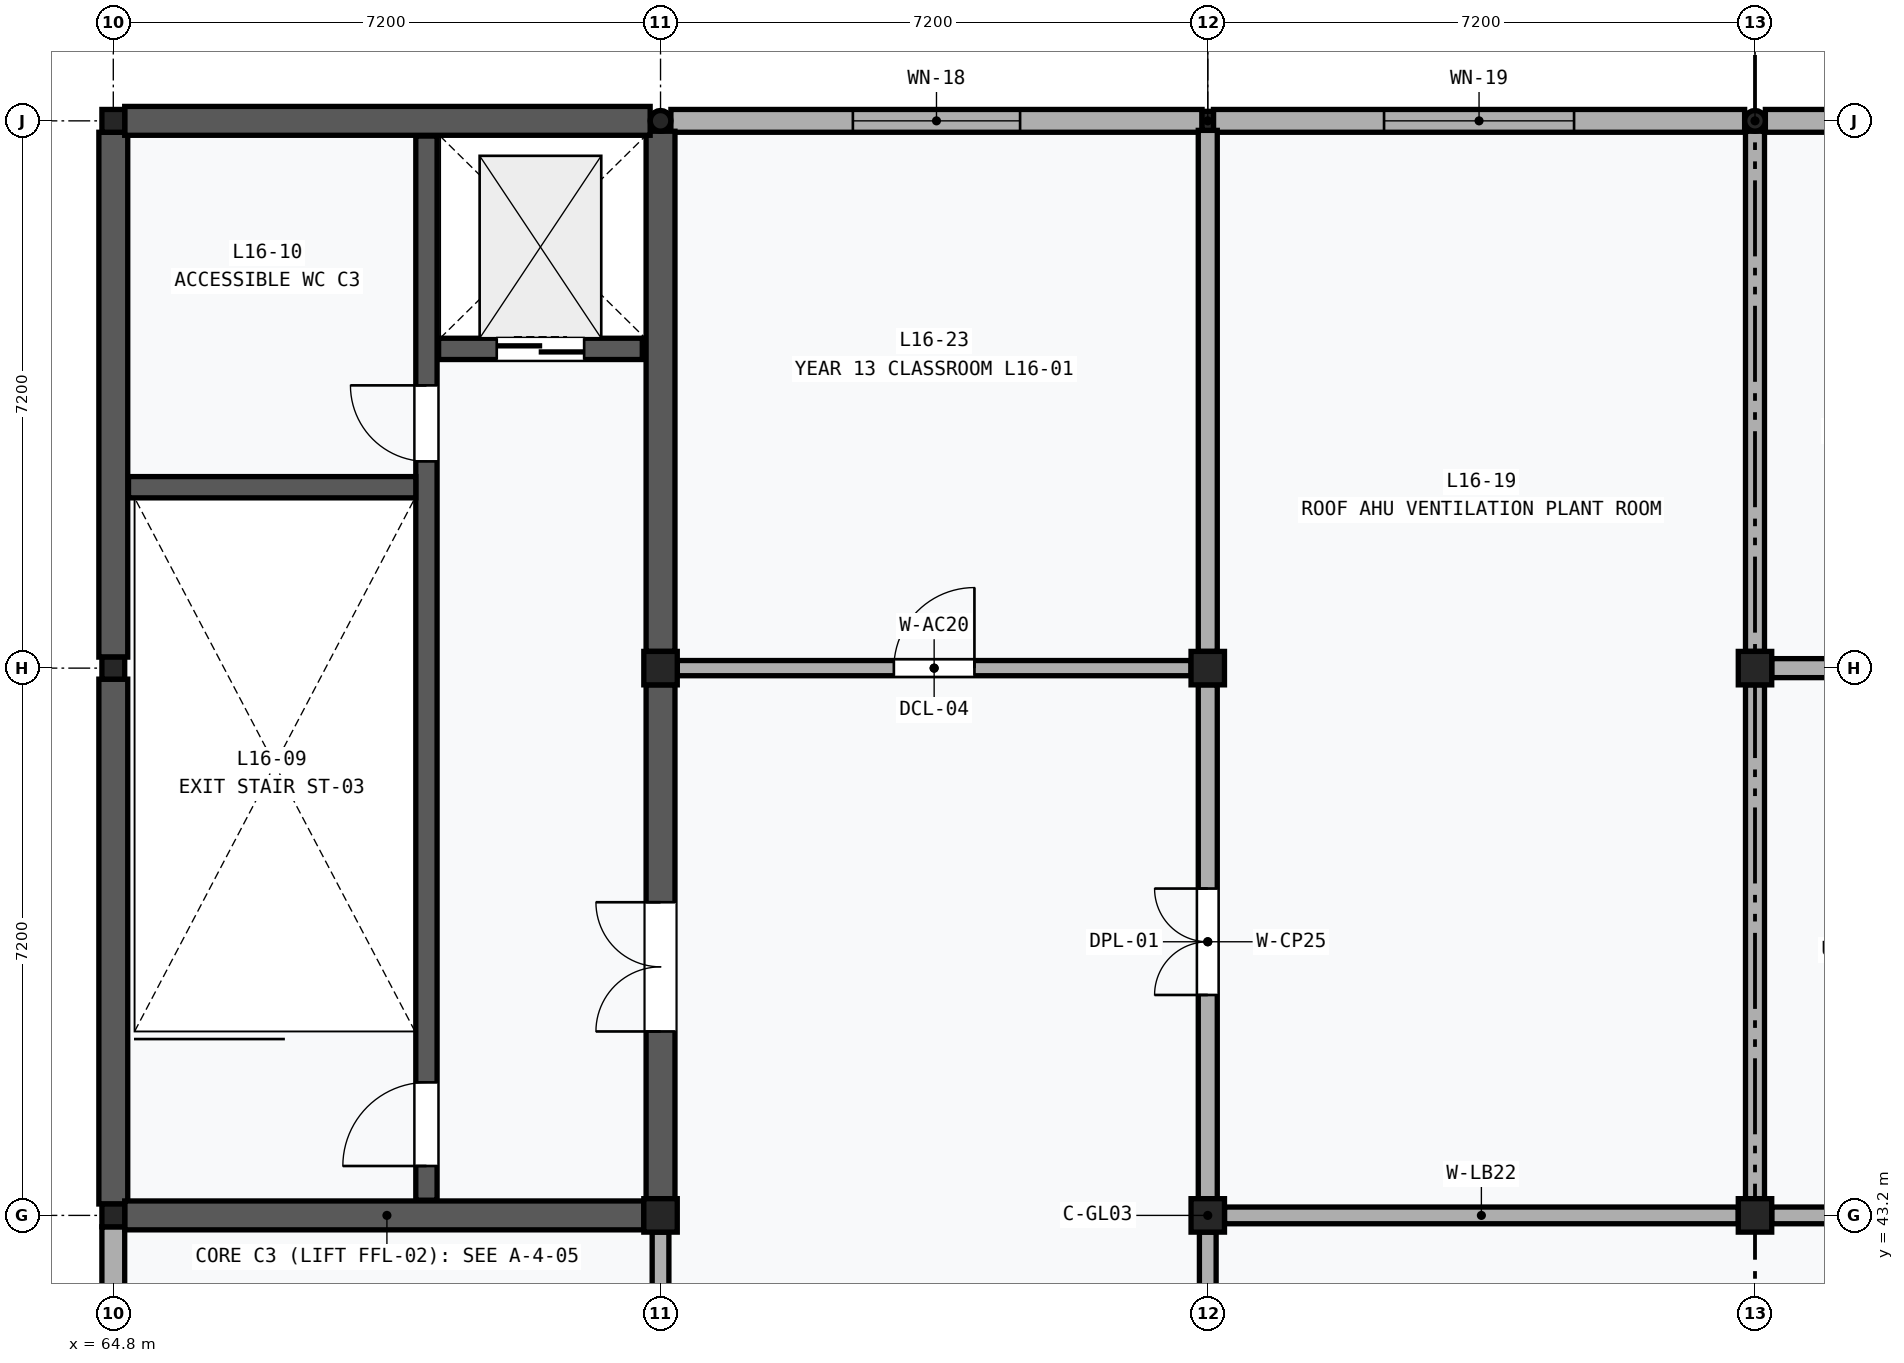
"""IFC4 building model, lengths in metres.
Left out: names, types, materials, properties, quantities, classifications, styles, units other than length and angle.
Written with IfcOpenShell. Run it as: python <this file> out.ifc"""

import sys

from ifc_helpers import new_model, si_unit, direction, frame, frame_2d, origin, origin_2d, place, context, subcontext, project, spatial, rectangle, hollow_rectangle, hollow_circle, i_section, extrude, element, fill, save


model = new_model("IFC4")
c1 = context("Model", 3, precision=1e-05, world=origin(), true_north=direction((0.0, 1.0)))
c2 = subcontext(c1, "Body", "Model", "MODEL_VIEW")
j1 = project(units=[si_unit("LENGTHUNIT", "METRE"), si_unit("PLANEANGLEUNIT", "RADIAN")], contexts=[c1])
p1 = place(None, origin())
s1 = spatial("IfcSite", under=j1, at=p1, CompositionType="ELEMENT")
p2 = place(p1, origin())
s2 = spatial("IfcBuilding", under=s1, at=p2, CompositionType="ELEMENT")
p3 = place(p2, frame((0.0, 0.0, 67.2)))
s3 = spatial("IfcBuildingStorey", under=s2, at=p3, CompositionType="ELEMENT", Elevation=67.2)
p4 = place(p3, frame((64.8, 43.2, 0.0), z_axis=(0.0, 0.0, 1.0), x_axis=(1.0, 0.0, 0.0)))
e1 = element("IfcColumn", 1, at=p4, inside=s3, PredefinedType="COLUMN", context=c2, shape_type="SweptSolid", body=[
    extrude(i_section(OverallWidth=0.3, OverallDepth=0.3, WebThickness=0.011, FlangeThickness=0.019, FilletRadius=0.027, at=origin_2d()), origin(), (0.0, 0.0, 1.0), 4.8),
])
p5 = place(p3, frame((64.8, 50.4, 0.0), z_axis=(0.0, 0.0, 1.0), x_axis=(1.0, 0.0, 0.0)))
e2 = element("IfcColumn", 2, at=p5, inside=s3, PredefinedType="COLUMN", context=c2, shape_type="SweptSolid", body=[
    extrude(i_section(OverallWidth=0.3, OverallDepth=0.29, WebThickness=0.009, FlangeThickness=0.014, FilletRadius=0.027, at=origin_2d()), origin(), (0.0, 0.0, 1.0), 4.8),
])
p6 = place(p3, frame((64.8, 57.6, 0.0), z_axis=(0.0, 0.0, 1.0), x_axis=(1.0, 0.0, 0.0)))
e3 = element("IfcColumn", 3, at=p6, inside=s3, PredefinedType="COLUMN", context=c2, shape_type="SweptSolid", body=[
    extrude(i_section(OverallWidth=0.3, OverallDepth=0.3, WebThickness=0.011, FlangeThickness=0.019, FilletRadius=0.027, at=origin_2d()), origin(), (0.0, 0.0, 1.0), 4.8),
])
for number, where, z_axis, x_axis in (
    (4, (72.0, 43.2, 0.0), (0.0, 0.0, 1.0), (1.0, 0.0, 0.0)),
    (5, (72.0, 50.4, 0.0), (0.0, 0.0, 1.0), (1.0, 0.0, 0.0)),
):
    element("IfcColumn", number, at=place(p3, frame(where, z_axis=z_axis, x_axis=x_axis)), inside=s3, PredefinedType="COLUMN", context=c2, shape_type="SweptSolid", body=[
        extrude(rectangle(XDim=0.44, YDim=0.44, at=origin_2d()), origin(), (0.0, 0.0, 1.0), 4.8),
    ])
p7 = place(p3, frame((72.0, 57.6, 0.0), z_axis=(0.0, 0.0, 1.0), x_axis=(1.0, 0.0, 0.0)))
e6 = element("IfcColumn", 6, at=p7, inside=s3, PredefinedType="COLUMN", context=c2, shape_type="SweptSolid", body=[
    extrude(hollow_circle(Radius=0.136, WallThickness=0.012, at=origin_2d()), origin(), (0.0, 0.0, 1.0), 4.8),
])
for number, where, z_axis, x_axis in (
    (7, (79.2, 43.2, 0.0), (0.0, 0.0, 1.0), (1.0, 0.0, 0.0)),
    (8, (79.2, 50.4, 0.0), (0.0, 0.0, 1.0), (1.0, 0.0, 0.0)),
):
    element("IfcColumn", number, at=place(p3, frame(where, z_axis=z_axis, x_axis=x_axis)), inside=s3, PredefinedType="COLUMN", context=c2, shape_type="SweptSolid", body=[
        extrude(rectangle(XDim=0.44, YDim=0.44, at=origin_2d()), origin(), (0.0, 0.0, 1.0), 4.8),
    ])
p8 = place(p3, frame((79.2, 57.6, 0.0), z_axis=(0.0, 0.0, 1.0), x_axis=(1.0, 0.0, 0.0)))
e9 = element("IfcColumn", 9, at=p8, inside=s3, PredefinedType="COLUMN", context=c2, shape_type="SweptSolid", body=[
    extrude(hollow_rectangle(XDim=0.15, YDim=0.25, WallThickness=0.01, at=origin_2d()), origin(), (0.0, 0.0, 1.0), 4.8),
])
for number, where, z_axis, x_axis in (
    (10, (86.4, 43.2, 0.0), (0.0, 0.0, 1.0), (1.0, 0.0, 0.0)),
    (11, (86.4, 50.4, 0.0), (0.0, 0.0, 1.0), (1.0, 0.0, 0.0)),
):
    element("IfcColumn", number, at=place(p3, frame(where, z_axis=z_axis, x_axis=x_axis)), inside=s3, PredefinedType="COLUMN", context=c2, shape_type="SweptSolid", body=[
        extrude(rectangle(XDim=0.44, YDim=0.44, at=origin_2d()), origin(), (0.0, 0.0, 1.0), 4.8),
    ])
p9 = place(p3, frame((86.4, 57.6, 0.0), z_axis=(0.0, 0.0, 1.0), x_axis=(1.0, 0.0, 0.0)))
e12 = element("IfcColumn", 12, at=p9, inside=s3, PredefinedType="COLUMN", context=c2, shape_type="SweptSolid", body=[
    extrude(hollow_circle(Radius=0.136, WallThickness=0.012, at=origin_2d()), origin(), (0.0, 0.0, 1.0), 4.8),
])
p10 = place(p3, frame((64.8, 36.145, 0.0), z_axis=(0.0, 0.0, 1.0), x_axis=(0.0, 1.0, 0.0)))
e13 = element("IfcWall", 13, at=p10, inside=s3, PredefinedType="SOLIDWALL", context=c2, shape_type="SweptSolid", body=[
    extrude(rectangle(XDim=6.905, YDim=0.3, at=frame_2d((3.453, 0.0))), origin(), (0.0, 0.0, 1.0), 4.16),
])
p11 = place(p10, frame((1.952, 0.0, 0.85)))
e14 = element("IfcOpeningElement", 14, at=p11, cuts=e13, PredefinedType="OPENING", context=c2, shape_type="SweptSolid", body=[
    extrude(rectangle(XDim=3.0, YDim=2.0, at=frame_2d((1.5, 1.0))), frame((0.0, 0.162, 0.0), z_axis=(0.0, -1.0, 0.0), x_axis=(1.0, 0.0, 0.0)), (0.0, 0.0, 1.0), 0.324),
])
p12 = place(p3, frame((72.136, 57.6, 0.0), z_axis=(0.0, 0.0, 1.0), x_axis=(1.0, 0.0, 0.0)))
e15 = element("IfcWall", 15, at=p12, inside=s3, PredefinedType="SOLIDWALL", context=c2, shape_type="SweptSolid", body=[
    extrude(rectangle(XDim=6.989, YDim=0.3, at=frame_2d((3.494, 0.0))), origin(), (0.0, 0.0, 1.0), 4.16),
])
p13 = place(p12, frame((2.394, 0.0, 1.1)))
e16 = element("IfcOpeningElement", 16, at=p13, cuts=e15, PredefinedType="OPENING", context=c2, shape_type="SweptSolid", body=[
    extrude(rectangle(XDim=2.2, YDim=1.5, at=frame_2d((1.1, 0.75))), frame((0.0, 0.162, 0.0), z_axis=(0.0, -1.0, 0.0), x_axis=(1.0, 0.0, 0.0)), (0.0, 0.0, 1.0), 0.324),
])
p14 = place(p3, frame((79.275, 57.6, 0.0), z_axis=(0.0, 0.0, 1.0), x_axis=(1.0, 0.0, 0.0)))
e17 = element("IfcWall", 17, at=p14, inside=s3, PredefinedType="SOLIDWALL", context=c2, shape_type="SweptSolid", body=[
    extrude(rectangle(XDim=6.989, YDim=0.3, at=frame_2d((3.494, 0.0))), origin(), (0.0, 0.0, 1.0), 4.16),
])
p15 = place(p14, frame((2.244, 0.0, 1.1)))
e18 = element("IfcOpeningElement", 18, at=p15, cuts=e17, PredefinedType="OPENING", context=c2, shape_type="SweptSolid", body=[
    extrude(rectangle(XDim=2.5, YDim=1.5, at=frame_2d((1.25, 0.75))), frame((0.0, 0.162, 0.0), z_axis=(0.0, -1.0, 0.0), x_axis=(1.0, 0.0, 0.0)), (0.0, 0.0, 1.0), 0.324),
])
p16 = place(p3, frame((86.537, 57.6, 0.0), z_axis=(0.0, 0.0, 1.0), x_axis=(1.0, 0.0, 0.0)))
e19 = element("IfcWall", 19, at=p16, inside=s3, PredefinedType="SOLIDWALL", context=c2, shape_type="SweptSolid", body=[
    extrude(rectangle(XDim=6.988, YDim=0.3, at=frame_2d((3.494, 0.0))), origin(), (0.0, 0.0, 1.0), 4.16),
])
p17 = place(p16, frame((2.744, 0.0, 1.2)))
e20 = element("IfcOpeningElement", 20, at=p17, cuts=e19, PredefinedType="OPENING", context=c2, shape_type="SweptSolid", body=[
    extrude(rectangle(XDim=1.5, YDim=1.35, at=frame_2d((0.75, 0.675))), frame((0.0, 0.162, 0.0), z_axis=(0.0, -1.0, 0.0), x_axis=(1.0, 0.0, 0.0)), (0.0, 0.0, 1.0), 0.324),
])
p18 = place(p3, frame((64.8, 43.35, 0.0), z_axis=(0.0, 0.0, 1.0), x_axis=(0.0, 1.0, 0.0)))
e21 = element("IfcWall", 21, at=p18, inside=s3, PredefinedType="SHEAR", context=c2, shape_type="SweptSolid", body=[
    extrude(rectangle(XDim=6.905, YDim=0.38, at=frame_2d((3.452, 0.0))), origin(), (0.0, 0.0, 1.0), 4.16),
])
p19 = place(p3, frame((64.8, 50.545, 0.0), z_axis=(0.0, 0.0, 1.0), x_axis=(0.0, 1.0, 0.0)))
e22 = element("IfcWall", 22, at=p19, inside=s3, PredefinedType="SHEAR", context=c2, shape_type="SweptSolid", body=[
    extrude(rectangle(XDim=6.905, YDim=0.38, at=frame_2d((3.453, 0.0))), origin(), (0.0, 0.0, 1.0), 4.16),
])
p20 = place(p3, frame((72.0, 43.42, 0.0), z_axis=(0.0, 0.0, 1.0), x_axis=(0.0, 1.0, 0.0)))
e23 = element("IfcWall", 23, at=p20, inside=s3, PredefinedType="SHEAR", context=c2, shape_type="SweptSolid", body=[
    extrude(rectangle(XDim=6.76, YDim=0.38, at=frame_2d((3.38, 0.0))), origin(), (0.0, 0.0, 1.0), 4.26),
])
p21 = place(p20, frame((2.2, 0.0, 0.0)))
e24 = element("IfcOpeningElement", 24, at=p21, cuts=e23, PredefinedType="OPENING", context=c2, shape_type="SweptSolid", body=[
    extrude(rectangle(XDim=1.7, YDim=2.25, at=frame_2d((0.85, 1.125))), frame((0.0, 0.202, 0.0), z_axis=(0.0, -1.0, 0.0), x_axis=(1.0, 0.0, 0.0)), (0.0, 0.0, 1.0), 0.404),
])
p22 = place(p3, frame((72.0, 50.62, 0.0), z_axis=(0.0, 0.0, 1.0), x_axis=(0.0, 1.0, 0.0)))
e25 = element("IfcWall", 25, at=p22, inside=s3, PredefinedType="SHEAR", context=c2, shape_type="SweptSolid", body=[
    extrude(rectangle(XDim=6.843, YDim=0.38, at=frame_2d((3.422, 0.0))), origin(), (0.0, 0.0, 1.0), 4.26),
])
p23 = place(p3, frame((64.95, 43.2, 0.0), z_axis=(0.0, 0.0, 1.0), x_axis=(1.0, 0.0, 0.0)))
e26 = element("IfcWall", 26, at=p23, inside=s3, PredefinedType="SHEAR", context=c2, shape_type="SweptSolid", body=[
    extrude(rectangle(XDim=6.83, YDim=0.38, at=frame_2d((3.415, 0.0))), origin(), (0.0, 0.0, 1.0), 4.2),
])
p24 = place(p3, frame((64.95, 57.6, 0.0), z_axis=(0.0, 0.0, 1.0), x_axis=(1.0, 0.0, 0.0)))
e27 = element("IfcWall", 27, at=p24, inside=s3, PredefinedType="SHEAR", context=c2, shape_type="SweptSolid", body=[
    extrude(rectangle(XDim=6.914, YDim=0.38, at=frame_2d((3.457, 0.0))), origin(), (0.0, 0.0, 1.0), 4.16),
])
p25 = place(p3, frame((68.92, 43.4, 0.0), z_axis=(0.0, 0.0, 1.0), x_axis=(0.0, 1.0, 0.0)))
e28 = element("IfcWall", 28, at=p25, inside=s3, PredefinedType="SHEAR", context=c2, shape_type="SweptSolid", body=[
    extrude(rectangle(XDim=14.0, YDim=0.28, at=frame_2d((7.0, 0.0))), origin(), (0.0, 0.0, 1.0), 4.54),
])
p26 = place(p25, frame((0.45, 0.0, 0.0)))
e29 = element("IfcOpeningElement", 29, at=p26, cuts=e28, PredefinedType="OPENING", context=c2, shape_type="SweptSolid", body=[
    extrude(rectangle(XDim=1.1, YDim=2.15, at=frame_2d((0.55, 1.075))), frame((0.0, 0.152, 0.0), z_axis=(0.0, -1.0, 0.0), x_axis=(1.0, 0.0, 0.0)), (0.0, 0.0, 1.0), 0.304),
])
p27 = place(p25, frame((9.72, 0.0, 0.0)))
e30 = element("IfcOpeningElement", 30, at=p27, cuts=e28, PredefinedType="OPENING", context=c2, shape_type="SweptSolid", body=[
    extrude(rectangle(XDim=1.0, YDim=2.15, at=frame_2d((0.5, 1.075))), frame((0.0, 0.152, 0.0), z_axis=(0.0, -1.0, 0.0), x_axis=(1.0, 0.0, 0.0)), (0.0, 0.0, 1.0), 0.304),
])
p28 = place(p3, frame((65.0, 52.78, 0.0), z_axis=(0.0, 0.0, 1.0), x_axis=(1.0, 0.0, 0.0)))
e31 = element("IfcWall", 31, at=p28, inside=s3, PredefinedType="SHEAR", context=c2, shape_type="SweptSolid", body=[
    extrude(rectangle(XDim=3.78, YDim=0.28, at=frame_2d((1.89, 0.0))), origin(), (0.0, 0.0, 1.0), 4.54),
])
p29 = place(p3, frame((69.08, 54.6, 0.0), z_axis=(0.0, 0.0, 1.0), x_axis=(1.0, 0.0, 0.0)))
e32 = element("IfcWall", 32, at=p29, inside=s3, PredefinedType="SHEAR", context=c2, shape_type="SweptSolid", body=[
    extrude(rectangle(XDim=2.68, YDim=0.28, at=frame_2d((1.34, 0.0))), origin(), (0.0, 0.0, 1.0), 4.54),
])
p30 = place(p29, frame((0.765, 0.0, 0.0)))
e33 = element("IfcOpeningElement", 33, at=p30, cuts=e32, PredefinedType="OPENING", context=c2, shape_type="SweptSolid", body=[
    extrude(rectangle(XDim=1.15, YDim=2.2, at=frame_2d((0.575, 1.1))), frame((0.0, 0.152, 0.0), z_axis=(0.0, -1.0, 0.0), x_axis=(1.0, 0.0, 0.0)), (0.0, 0.0, 1.0), 0.304),
])
p31 = place(p3, frame((79.42, 43.2, 0.0), z_axis=(0.0, 0.0, 1.0), x_axis=(1.0, 0.0, 0.0)))
e34 = element("IfcWall", 34, at=p31, inside=s3, PredefinedType="PARTITIONING", context=c2, shape_type="SweptSolid", body=[
    extrude(rectangle(XDim=6.76, YDim=0.22, at=frame_2d((3.38, 0.0))), origin(), (0.0, 0.0, 1.0), 4.2),
])
p32 = place(p3, frame((79.2, 36.22, 0.0), z_axis=(0.0, 0.0, 1.0), x_axis=(0.0, 1.0, 0.0)))
e35 = element("IfcWall", 35, at=p32, inside=s3, PredefinedType="PARTITIONING", context=c2, shape_type="SweptSolid", body=[
    extrude(rectangle(XDim=6.76, YDim=0.22, at=frame_2d((3.38, 0.0))), origin(), (0.0, 0.0, 1.0), 4.26),
])
p33 = place(p32, frame((2.76, 0.0, 0.0)))
e36 = element("IfcOpeningElement", 36, at=p33, cuts=e35, PredefinedType="OPENING", context=c2, shape_type="SweptSolid", body=[
    extrude(rectangle(XDim=1.24, YDim=2.26, at=frame_2d((0.62, 1.13))), frame((0.0, 0.122, 0.0), z_axis=(0.0, -1.0, 0.0), x_axis=(1.0, 0.0, 0.0)), (0.0, 0.0, 1.0), 0.244),
])
p34 = place(p3, frame((86.62, 43.2, 0.0), z_axis=(0.0, 0.0, 1.0), x_axis=(1.0, 0.0, 0.0)))
e37 = element("IfcWall", 37, at=p34, inside=s3, PredefinedType="PARTITIONING", context=c2, shape_type="SweptSolid", body=[
    extrude(rectangle(XDim=6.76, YDim=0.22, at=frame_2d((3.38, 0.0))), origin(), (0.0, 0.0, 1.0), 4.2),
])
p35 = place(p3, frame((79.2, 43.42, 0.0), z_axis=(0.0, 0.0, 1.0), x_axis=(0.0, 1.0, 0.0)))
e38 = element("IfcWall", 38, at=p35, inside=s3, PredefinedType="PARTITIONING", context=c2, shape_type="SweptSolid", body=[
    extrude(rectangle(XDim=6.76, YDim=0.25, at=frame_2d((3.38, 0.0))), origin(), (0.0, 0.0, 1.0), 4.26),
])
p36 = place(p35, frame((2.68, 0.0, 0.0)))
e39 = element("IfcOpeningElement", 39, at=p36, cuts=e38, PredefinedType="OPENING", context=c2, shape_type="SweptSolid", body=[
    extrude(rectangle(XDim=1.4, YDim=2.25, at=frame_2d((0.7, 1.125))), frame((0.0, 0.137, 0.0), z_axis=(0.0, -1.0, 0.0), x_axis=(1.0, 0.0, 0.0)), (0.0, 0.0, 1.0), 0.274),
])
p37 = place(p3, frame((86.4, 43.42, 0.0), z_axis=(0.0, 0.0, 1.0), x_axis=(0.0, 1.0, 0.0)))
e40 = element("IfcWall", 40, at=p37, inside=s3, PredefinedType="PARTITIONING", context=c2, shape_type="SweptSolid", body=[
    extrude(rectangle(XDim=6.76, YDim=0.25, at=frame_2d((3.38, 0.0))), origin(), (0.0, 0.0, 1.0), 4.26),
])
p38 = place(p3, frame((79.2, 50.62, 0.0), z_axis=(0.0, 0.0, 1.0), x_axis=(0.0, 1.0, 0.0)))
e41 = element("IfcWall", 41, at=p38, inside=s3, PredefinedType="PARTITIONING", context=c2, shape_type="SweptSolid", body=[
    extrude(rectangle(XDim=6.855, YDim=0.25, at=frame_2d((3.427, 0.0))), origin(), (0.0, 0.0, 1.0), 4.26),
])
p39 = place(p3, frame((86.4, 50.62, 0.0), z_axis=(0.0, 0.0, 1.0), x_axis=(0.0, 1.0, 0.0)))
e42 = element("IfcWall", 42, at=p39, inside=s3, PredefinedType="PARTITIONING", context=c2, shape_type="SweptSolid", body=[
    extrude(rectangle(XDim=6.843, YDim=0.25, at=frame_2d((3.422, 0.0))), origin(), (0.0, 0.0, 1.0), 4.26),
])
p40 = place(p3, frame((86.62, 50.4, 0.0), z_axis=(0.0, 0.0, 1.0), x_axis=(1.0, 0.0, 0.0)))
e43 = element("IfcWall", 43, at=p40, inside=s3, PredefinedType="PARTITIONING", context=c2, shape_type="SweptSolid", body=[
    extrude(rectangle(XDim=6.76, YDim=0.25, at=frame_2d((3.38, 0.0))), origin(), (0.0, 0.0, 1.0), 4.2),
])
p41 = place(p3, frame((72.0, 36.22, 0.0), z_axis=(0.0, 0.0, 1.0), x_axis=(0.0, 1.0, 0.0)))
e44 = element("IfcWall", 44, at=p41, inside=s3, PredefinedType="PARTITIONING", context=c2, shape_type="SweptSolid", body=[
    extrude(rectangle(XDim=6.76, YDim=0.22, at=frame_2d((3.38, 0.0))), origin(), (0.0, 0.0, 1.0), 4.26),
])
p42 = place(p3, frame((72.22, 50.4, 0.0), z_axis=(0.0, 0.0, 1.0), x_axis=(1.0, 0.0, 0.0)))
e45 = element("IfcWall", 45, at=p42, inside=s3, PredefinedType="PARTITIONING", context=c2, shape_type="SweptSolid", body=[
    extrude(rectangle(XDim=6.76, YDim=0.2, at=frame_2d((3.38, 0.0))), origin(), (0.0, 0.0, 1.0), 4.2),
])
p43 = place(p42, frame((2.85, 0.0, 0.0)))
e46 = element("IfcOpeningElement", 46, at=p43, cuts=e45, PredefinedType="OPENING", context=c2, shape_type="SweptSolid", body=[
    extrude(rectangle(XDim=1.06, YDim=2.16, at=frame_2d((0.53, 1.08))), frame((0.0, 0.112, 0.0), z_axis=(0.0, -1.0, 0.0), x_axis=(1.0, 0.0, 0.0)), (0.0, 0.0, 1.0), 0.224),
])
p44 = place(p13, origin())
e47 = element("IfcWindow", 47, at=p44, inside=s3, PartitioningType="SINGLE_PANEL", PredefinedType="WINDOW", context=c2, shape_type="SweptSolid", body=[
    extrude(rectangle(XDim=2.2, YDim=1.5, at=frame_2d((1.1, 0.75))), frame((0.0, 0.03, 0.0), z_axis=(0.0, -1.0, 0.0), x_axis=(1.0, 0.0, 0.0)), (0.0, 0.0, 1.0), 0.06),
])
fill(e16, e47)
p45 = place(p15, origin())
e48 = element("IfcWindow", 48, at=p45, inside=s3, PartitioningType="SINGLE_PANEL", PredefinedType="WINDOW", context=c2, shape_type="SweptSolid", body=[
    extrude(rectangle(XDim=2.5, YDim=1.5, at=frame_2d((1.25, 0.75))), frame((0.0, 0.03, 0.0), z_axis=(0.0, -1.0, 0.0), x_axis=(1.0, 0.0, 0.0)), (0.0, 0.0, 1.0), 0.06),
])
fill(e18, e48)
p46 = place(p21, origin())
e49 = element("IfcDoor", 49, at=p46, inside=s3, OperationType="DOUBLE_DOOR_SINGLE_SWING", PredefinedType="DOOR", context=c2, shape_type="SweptSolid", body=[
    extrude(rectangle(XDim=1.7, YDim=2.25, at=frame_2d((0.85, 1.125))), frame((0.0, 0.025, 0.0), z_axis=(0.0, -1.0, 0.0), x_axis=(1.0, 0.0, 0.0)), (0.0, 0.0, 1.0), 0.05),
])
fill(e24, e49)
p47 = place(p26, origin())
e50 = element("IfcDoor", 50, at=p47, inside=s3, OperationType="SINGLE_SWING_LEFT", PredefinedType="DOOR", context=c2, shape_type="SweptSolid", body=[
    extrude(rectangle(XDim=1.1, YDim=2.15, at=frame_2d((0.55, 1.075))), frame((0.0, 0.025, 0.0), z_axis=(0.0, -1.0, 0.0), x_axis=(1.0, 0.0, 0.0)), (0.0, 0.0, 1.0), 0.05),
])
fill(e29, e50)
p48 = place(p27, origin())
e51 = element("IfcDoor", 51, at=p48, inside=s3, OperationType="SINGLE_SWING_RIGHT", PredefinedType="DOOR", context=c2, shape_type="SweptSolid", body=[
    extrude(rectangle(XDim=1.0, YDim=2.15, at=frame_2d((0.5, 1.075))), frame((0.0, 0.025, 0.0), z_axis=(0.0, -1.0, 0.0), x_axis=(1.0, 0.0, 0.0)), (0.0, 0.0, 1.0), 0.05),
])
fill(e30, e51)
p49 = place(p30, frame((1.15, 0.0, 0.0), z_axis=(0.0, 0.0, 1.0), x_axis=(-1.0, 0.0, 0.0)))
e52 = element("IfcDoor", 52, at=p49, inside=s3, OperationType="DOUBLE_DOOR_SLIDING", PredefinedType="DOOR", context=c2, shape_type="SweptSolid", body=[
    extrude(rectangle(XDim=1.15, YDim=2.2, at=frame_2d((0.575, 1.1))), frame((0.0, 0.025, 0.0), z_axis=(0.0, -1.0, 0.0), x_axis=(1.0, 0.0, 0.0)), (0.0, 0.0, 1.0), 0.05),
])
fill(e33, e52)
p50 = place(p36, origin())
e53 = element("IfcDoor", 53, at=p50, inside=s3, OperationType="DOUBLE_DOOR_SINGLE_SWING", PredefinedType="DOOR", context=c2, shape_type="SweptSolid", body=[
    extrude(rectangle(XDim=1.4, YDim=2.25, at=frame_2d((0.7, 1.125))), frame((0.0, 0.025, 0.0), z_axis=(0.0, -1.0, 0.0), x_axis=(1.0, 0.0, 0.0)), (0.0, 0.0, 1.0), 0.05),
])
fill(e39, e53)
p51 = place(p43, origin())
e54 = element("IfcDoor", 54, at=p51, inside=s3, OperationType="SINGLE_SWING_RIGHT", PredefinedType="DOOR", context=c2, shape_type="SweptSolid", body=[
    extrude(rectangle(XDim=1.06, YDim=2.16, at=frame_2d((0.53, 1.08))), frame((0.0, 0.025, 0.0), z_axis=(0.0, -1.0, 0.0), x_axis=(1.0, 0.0, 0.0)), (0.0, 0.0, 1.0), 0.05),
])
fill(e46, e54)
save(model, sys.argv[1])
